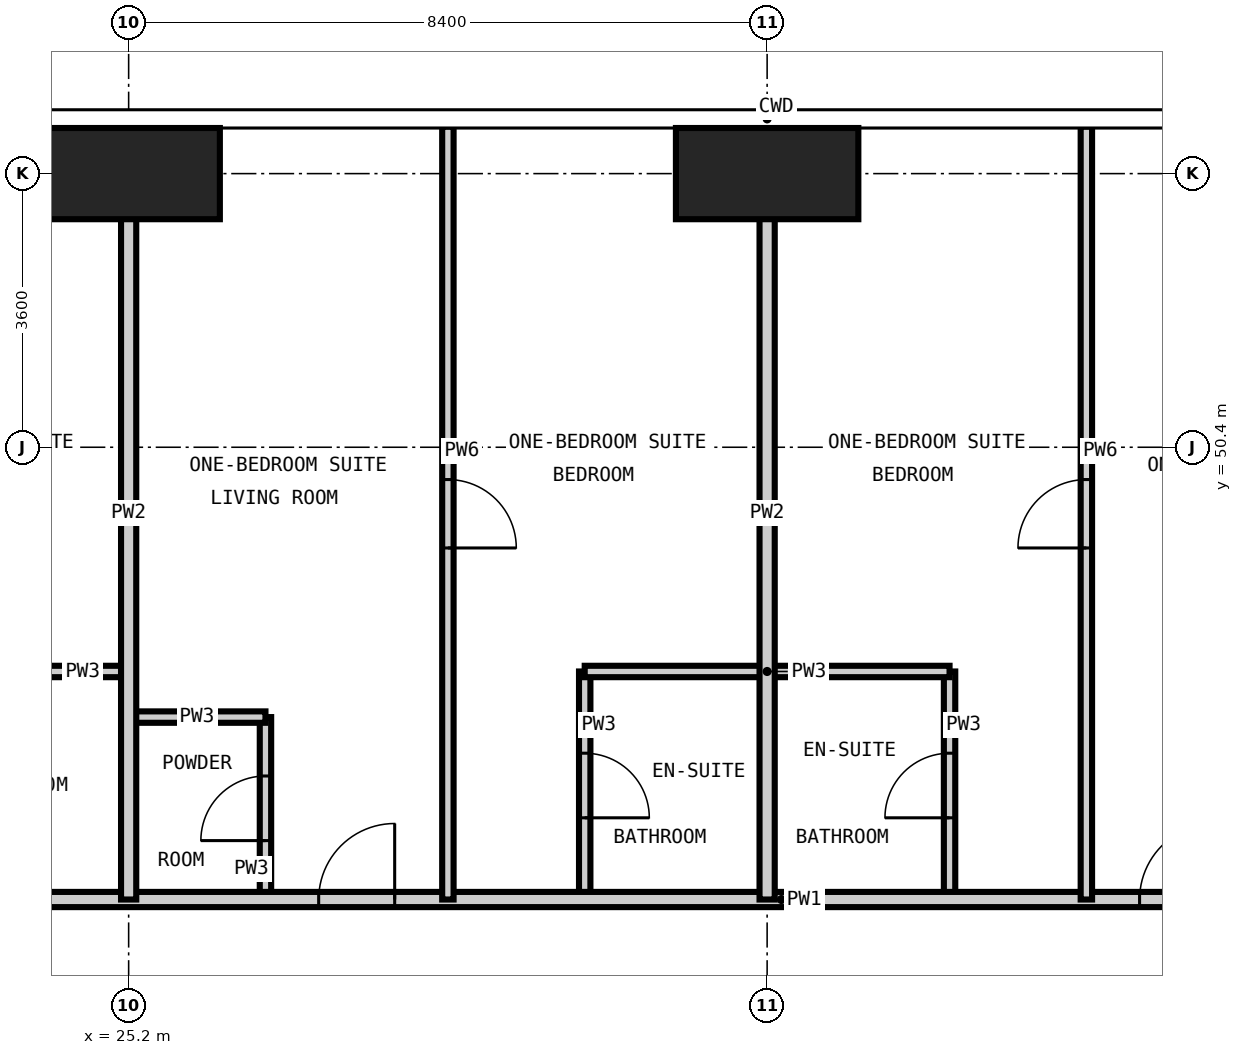
"""IFC4 building model, lengths in metres.
Left out: names, types, materials, properties, quantities, classifications, styles, units other than length and angle.
Written with IfcOpenShell. Run it as: python <this file> out.ifc"""

import sys

from ifc_helpers import new_model, si_unit, direction, frame, frame_2d, origin, origin_2d, place, context, subcontext, project, spatial, rectangle, extrude, element, fill, save


model = new_model("IFC4")
c1 = context("Model", 3, precision=1e-05, world=origin(), true_north=direction((0.0, 1.0)))
c2 = subcontext(c1, "Body", "Model", "MODEL_VIEW")
j1 = project(units=[si_unit("LENGTHUNIT", "METRE"), si_unit("PLANEANGLEUNIT", "RADIAN")], contexts=[c1])
p1 = place(None, origin())
s1 = spatial("IfcSite", under=j1, at=p1, CompositionType="ELEMENT")
p2 = place(p1, origin())
s2 = spatial("IfcBuilding", under=s1, at=p2, CompositionType="ELEMENT")
p3 = place(p2, frame((0.0, 0.0, 225.6)))
s3 = spatial("IfcBuildingStorey", under=s2, at=p3, CompositionType="ELEMENT", Elevation=225.6)
for number, where, z_axis, x_axis in (
    (1, (25.2, 54.0, -0.35), (0.0, 0.0, 1.0), (1.0, 0.0, 0.0)),
    (2, (33.6, 54.0, -0.35), (0.0, 0.0, 1.0), (1.0, 0.0, 0.0)),
):
    element("IfcColumn", number, at=place(p3, frame(where, z_axis=z_axis, x_axis=x_axis)), inside=s3, PredefinedType="COLUMN", context=c2, shape_type="SweptSolid", body=[
        extrude(rectangle(XDim=2.4, YDim=1.2, at=origin_2d()), origin(), (0.0, 0.0, 1.0), 3.9),
    ])
p4 = place(p3, frame((27.0, 44.45, 0.0), z_axis=(0.0, 0.0, 1.0), x_axis=(0.0, 1.0, 0.0)))
e3 = element("IfcWall", 3, at=p4, inside=s3, PredefinedType="PARTITIONING", context=c2, shape_type="SweptSolid", body=[
    extrude(rectangle(XDim=2.4, YDim=0.15, at=frame_2d((1.2, 0.0))), origin(), (0.0, 0.0, 1.0), 3.55),
])
p5 = place(p4, frame((0.775, 0.0, 0.0)))
e4 = element("IfcOpeningElement", 4, at=p5, cuts=e3, PredefinedType="OPENING", context=c2, shape_type="SweptSolid", body=[
    extrude(rectangle(XDim=0.85, YDim=2.1, at=frame_2d((0.425, 1.05))), frame((0.0, 0.085, 0.0), z_axis=(0.0, -1.0, 0.0), x_axis=(1.0, 0.0, 0.0)), (0.0, 0.0, 1.0), 0.17),
])
p6 = place(p3, frame((31.2, 44.45, 0.0), z_axis=(0.0, 0.0, 1.0), x_axis=(0.0, 1.0, 0.0)))
e5 = element("IfcWall", 5, at=p6, inside=s3, PredefinedType="PARTITIONING", context=c2, shape_type="SweptSolid", body=[
    extrude(rectangle(XDim=3.0, YDim=0.15, at=frame_2d((1.5, 0.0))), origin(), (0.0, 0.0, 1.0), 3.55),
])
p7 = place(p6, frame((1.075, 0.0, 0.0)))
e6 = element("IfcOpeningElement", 6, at=p7, cuts=e5, PredefinedType="OPENING", context=c2, shape_type="SweptSolid", body=[
    extrude(rectangle(XDim=0.85, YDim=2.1, at=frame_2d((0.425, 1.05))), frame((0.0, 0.085, 0.0), z_axis=(0.0, -1.0, 0.0), x_axis=(1.0, 0.0, 0.0)), (0.0, 0.0, 1.0), 0.17),
])
p8 = place(p3, frame((36.0, 44.45, 0.0), z_axis=(0.0, 0.0, 1.0), x_axis=(0.0, 1.0, 0.0)))
e7 = element("IfcWall", 7, at=p8, inside=s3, PredefinedType="PARTITIONING", context=c2, shape_type="SweptSolid", body=[
    extrude(rectangle(XDim=3.0, YDim=0.15, at=frame_2d((1.5, 0.0))), origin(), (0.0, 0.0, 1.0), 3.55),
])
p9 = place(p8, frame((1.075, 0.0, 0.0)))
e8 = element("IfcOpeningElement", 8, at=p9, cuts=e7, PredefinedType="OPENING", context=c2, shape_type="SweptSolid", body=[
    extrude(rectangle(XDim=0.85, YDim=2.1, at=frame_2d((0.425, 1.05))), frame((0.0, 0.085, 0.0), z_axis=(0.0, -1.0, 0.0), x_axis=(1.0, 0.0, 0.0)), (0.0, 0.0, 1.0), 0.17),
])
p10 = place(p3, frame((25.2, 46.85, 0.0), z_axis=(0.0, 0.0, 1.0), x_axis=(1.0, 0.0, 0.0)))
e9 = element("IfcWall", 9, at=p10, inside=s3, PredefinedType="PARTITIONING", context=c2, shape_type="SweptSolid", body=[
    extrude(rectangle(XDim=1.8, YDim=0.15, at=frame_2d((0.9, 0.0))), origin(), (0.0, 0.0, 1.0), 3.55),
])
p11 = place(p3, frame((21.925, 47.45, 0.0), z_axis=(0.0, 0.0, 1.0), x_axis=(1.0, 0.0, 0.0)))
e10 = element("IfcWall", 10, at=p11, inside=s3, PredefinedType="PARTITIONING", context=c2, shape_type="SweptSolid", body=[
    extrude(rectangle(XDim=3.275, YDim=0.15, at=frame_2d((1.637, 0.0))), origin(), (0.0, 0.0, 1.0), 3.55),
])
p12 = place(p11, frame((1.212, 0.0, 0.0)))
e11 = element("IfcOpeningElement", 11, at=p12, cuts=e10, PredefinedType="OPENING", context=c2, shape_type="SweptSolid", body=[
    extrude(rectangle(XDim=0.85, YDim=2.1, at=frame_2d((0.425, 1.05))), frame((0.0, 0.085, 0.0), z_axis=(0.0, -1.0, 0.0), x_axis=(1.0, 0.0, 0.0)), (0.0, 0.0, 1.0), 0.17),
])
p13 = place(p3, frame((31.2, 47.45, 0.0), z_axis=(0.0, 0.0, 1.0), x_axis=(1.0, 0.0, 0.0)))
e12 = element("IfcWall", 12, at=p13, inside=s3, PredefinedType="PARTITIONING", context=c2, shape_type="SweptSolid", body=[
    extrude(rectangle(XDim=4.8, YDim=0.15, at=frame_2d((2.4, 0.0))), origin(), (0.0, 0.0, 1.0), 3.55),
])
p14 = place(p3, frame((21.925, 44.45, 0.0), z_axis=(0.0, 0.0, 1.0), x_axis=(1.0, 0.0, 0.0)))
e13 = element("IfcWall", 13, at=p14, inside=s3, PredefinedType="PARTITIONING", context=c2, shape_type="SweptSolid", body=[
    extrude(rectangle(XDim=23.725, YDim=0.2, at=frame_2d((11.862, 0.0))), origin(), (0.0, 0.0, 1.0), 3.55),
])
p15 = place(p14, frame((5.775, 0.0, 0.0)))
e14 = element("IfcOpeningElement", 14, at=p15, cuts=e13, PredefinedType="OPENING", context=c2, shape_type="SweptSolid", body=[
    extrude(rectangle(XDim=1.0, YDim=2.2, at=frame_2d((0.5, 1.1))), frame((0.0, 0.11, 0.0), z_axis=(0.0, -1.0, 0.0), x_axis=(1.0, 0.0, 0.0)), (0.0, 0.0, 1.0), 0.22),
])
p16 = place(p14, frame((16.575, 0.0, 0.0)))
e15 = element("IfcOpeningElement", 15, at=p16, cuts=e13, PredefinedType="OPENING", context=c2, shape_type="SweptSolid", body=[
    extrude(rectangle(XDim=1.0, YDim=2.2, at=frame_2d((0.5, 1.1))), frame((0.0, 0.11, 0.0), z_axis=(0.0, -1.0, 0.0), x_axis=(1.0, 0.0, 0.0)), (0.0, 0.0, 1.0), 0.22),
])
for number, where, z_axis, x_axis in (
    (16, (25.2, 44.45, 0.0), (0.0, 0.0, 1.0), (0.0, 1.0, 0.0)),
    (17, (33.6, 44.45, 0.0), (0.0, 0.0, 1.0), (0.0, 1.0, 0.0)),
):
    element("IfcWall", number, at=place(p3, frame(where, z_axis=z_axis, x_axis=x_axis)), inside=s3, PredefinedType="PARTITIONING", context=c2, shape_type="SweptSolid", body=[
        extrude(rectangle(XDim=10.168, YDim=0.2, at=frame_2d((5.084, 0.0))), origin(), (0.0, 0.0, 1.0), 3.55),
    ])
p17 = place(p3, frame((29.4, 44.45, 0.0), z_axis=(0.0, 0.0, 1.0), x_axis=(0.0, 1.0, 0.0)))
e18 = element("IfcWall", 18, at=p17, inside=s3, PredefinedType="PARTITIONING", context=c2, shape_type="SweptSolid", body=[
    extrude(rectangle(XDim=10.168, YDim=0.15, at=frame_2d((5.084, 0.0))), origin(), (0.0, 0.0, 1.0), 3.55),
])
p18 = place(p17, frame((4.625, 0.0, 0.0)))
e19 = element("IfcOpeningElement", 19, at=p18, cuts=e18, PredefinedType="OPENING", context=c2, shape_type="SweptSolid", body=[
    extrude(rectangle(XDim=0.9, YDim=2.1, at=frame_2d((0.45, 1.05))), frame((0.0, 0.085, 0.0), z_axis=(0.0, -1.0, 0.0), x_axis=(1.0, 0.0, 0.0)), (0.0, 0.0, 1.0), 0.17),
])
p19 = place(p3, frame((37.8, 44.45, 0.0), z_axis=(0.0, 0.0, 1.0), x_axis=(0.0, 1.0, 0.0)))
e20 = element("IfcWall", 20, at=p19, inside=s3, PredefinedType="PARTITIONING", context=c2, shape_type="SweptSolid", body=[
    extrude(rectangle(XDim=10.168, YDim=0.15, at=frame_2d((5.084, 0.0))), origin(), (0.0, 0.0, 1.0), 3.55),
])
p20 = place(p19, frame((4.625, 0.0, 0.0)))
e21 = element("IfcOpeningElement", 21, at=p20, cuts=e20, PredefinedType="OPENING", context=c2, shape_type="SweptSolid", body=[
    extrude(rectangle(XDim=0.9, YDim=2.1, at=frame_2d((0.45, 1.05))), frame((0.0, 0.085, 0.0), z_axis=(0.0, -1.0, 0.0), x_axis=(1.0, 0.0, 0.0)), (0.0, 0.0, 1.0), 0.17),
])
p21 = place(p15, origin())
e22 = element("IfcDoor", 22, at=p21, inside=s3, OperationType="SINGLE_SWING_RIGHT", PredefinedType="DOOR", context=c2, shape_type="SweptSolid", body=[
    extrude(rectangle(XDim=1.0, YDim=2.2, at=frame_2d((0.5, 1.1))), frame((0.0, 0.025, 0.0), z_axis=(0.0, -1.0, 0.0), x_axis=(1.0, 0.0, 0.0)), (0.0, 0.0, 1.0), 0.05),
])
fill(e14, e22)
p22 = place(p5, origin())
e23 = element("IfcDoor", 23, at=p22, inside=s3, OperationType="SINGLE_SWING_LEFT", PredefinedType="DOOR", context=c2, shape_type="SweptSolid", body=[
    extrude(rectangle(XDim=0.85, YDim=2.1, at=frame_2d((0.425, 1.05))), frame((0.0, 0.025, 0.0), z_axis=(0.0, -1.0, 0.0), x_axis=(1.0, 0.0, 0.0)), (0.0, 0.0, 1.0), 0.05),
])
fill(e4, e23)
p23 = place(p18, frame((0.9, 0.0, 0.0), z_axis=(0.0, 0.0, 1.0), x_axis=(-1.0, 0.0, 0.0)))
e24 = element("IfcDoor", 24, at=p23, inside=s3, OperationType="SINGLE_SWING_RIGHT", PredefinedType="DOOR", context=c2, shape_type="SweptSolid", body=[
    extrude(rectangle(XDim=0.9, YDim=2.1, at=frame_2d((0.45, 1.05))), frame((0.0, 0.025, 0.0), z_axis=(0.0, -1.0, 0.0), x_axis=(1.0, 0.0, 0.0)), (0.0, 0.0, 1.0), 0.05),
])
fill(e19, e24)
p24 = place(p7, frame((0.85, 0.0, 0.0), z_axis=(0.0, 0.0, 1.0), x_axis=(-1.0, 0.0, 0.0)))
e25 = element("IfcDoor", 25, at=p24, inside=s3, OperationType="SINGLE_SWING_RIGHT", PredefinedType="DOOR", context=c2, shape_type="SweptSolid", body=[
    extrude(rectangle(XDim=0.85, YDim=2.1, at=frame_2d((0.425, 1.05))), frame((0.0, 0.025, 0.0), z_axis=(0.0, -1.0, 0.0), x_axis=(1.0, 0.0, 0.0)), (0.0, 0.0, 1.0), 0.05),
])
fill(e6, e25)
p25 = place(p16, origin())
e26 = element("IfcDoor", 26, at=p25, inside=s3, OperationType="SINGLE_SWING_RIGHT", PredefinedType="DOOR", context=c2, shape_type="SweptSolid", body=[
    extrude(rectangle(XDim=1.0, YDim=2.2, at=frame_2d((0.5, 1.1))), frame((0.0, 0.025, 0.0), z_axis=(0.0, -1.0, 0.0), x_axis=(1.0, 0.0, 0.0)), (0.0, 0.0, 1.0), 0.05),
])
fill(e15, e26)
p26 = place(p20, origin())
e27 = element("IfcDoor", 27, at=p26, inside=s3, OperationType="SINGLE_SWING_LEFT", PredefinedType="DOOR", context=c2, shape_type="SweptSolid", body=[
    extrude(rectangle(XDim=0.9, YDim=2.1, at=frame_2d((0.45, 1.05))), frame((0.0, 0.025, 0.0), z_axis=(0.0, -1.0, 0.0), x_axis=(1.0, 0.0, 0.0)), (0.0, 0.0, 1.0), 0.05),
])
fill(e21, e27)
p27 = place(p9, origin())
e28 = element("IfcDoor", 28, at=p27, inside=s3, OperationType="SINGLE_SWING_LEFT", PredefinedType="DOOR", context=c2, shape_type="SweptSolid", body=[
    extrude(rectangle(XDim=0.85, YDim=2.1, at=frame_2d((0.425, 1.05))), frame((0.0, 0.025, 0.0), z_axis=(0.0, -1.0, 0.0), x_axis=(1.0, 0.0, 0.0)), (0.0, 0.0, 1.0), 0.05),
])
fill(e8, e28)
save(model, sys.argv[1])
